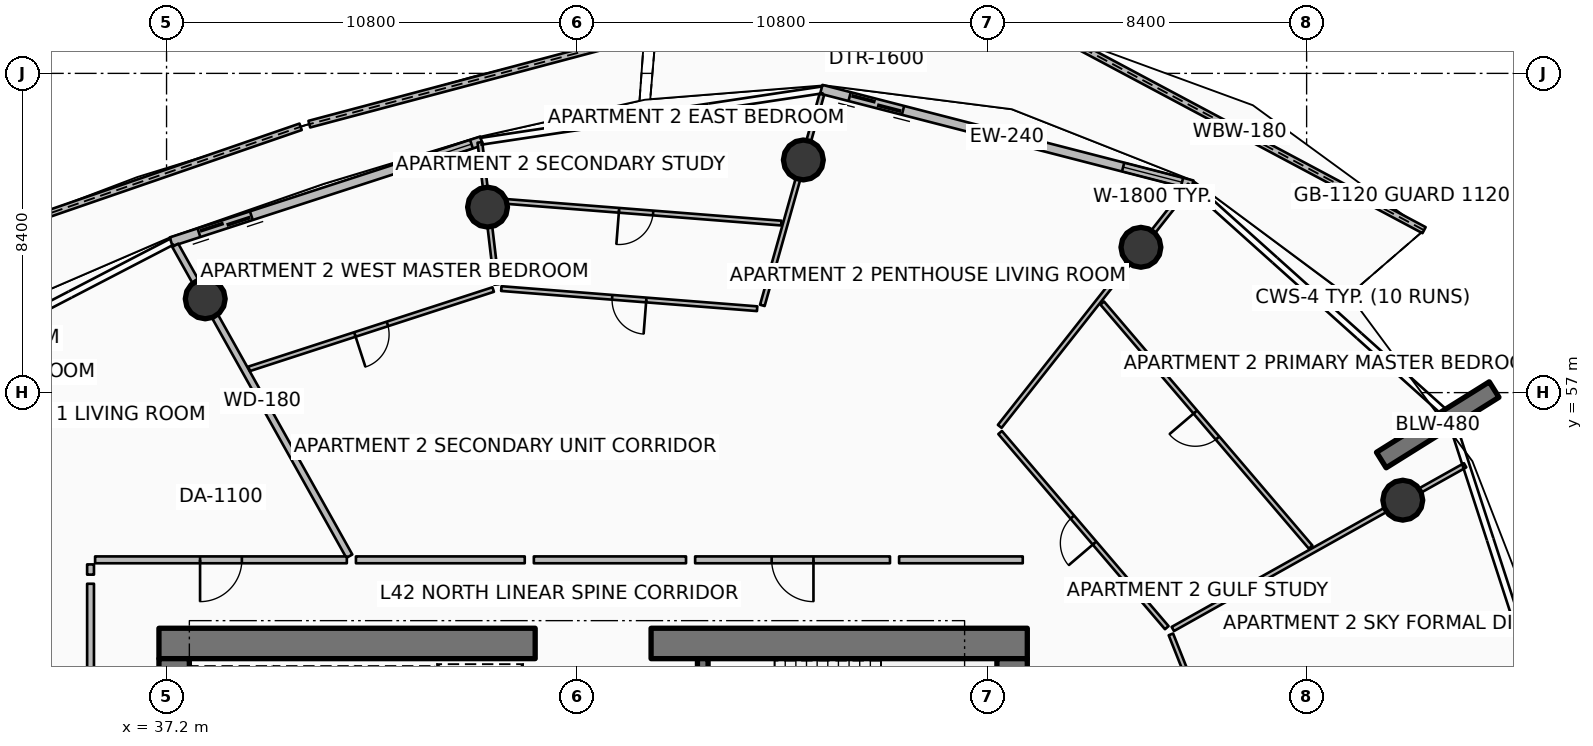
"""IFC4 building model, lengths in metres.
Left out: names, types, materials, properties, quantities, classifications, styles, units other than length and angle.
Written with IfcOpenShell. Run it as: python <this file> out.ifc"""

import sys

from ifc_helpers import new_model, si_unit, direction, frame, frame_2d, origin, origin_2d, place, context, subcontext, project, spatial, polyline, rectangle, circle, outline, extrude, element, fill, save


model = new_model("IFC4")
c1 = context("Model", 3, precision=1e-05, world=origin(), true_north=direction((0.0, 1.0)))
c2 = subcontext(c1, "Body", "Model", "MODEL_VIEW")
j1 = project(units=[si_unit("LENGTHUNIT", "METRE"), si_unit("PLANEANGLEUNIT", "RADIAN")], contexts=[c1])
p1 = place(None, origin())
s1 = spatial("IfcSite", under=j1, at=p1, CompositionType="ELEMENT")
p2 = place(p1, origin())
s2 = spatial("IfcBuilding", under=s1, at=p2, CompositionType="ELEMENT")
p3 = place(p2, frame((0.0, 0.0, 169.05)))
s3 = spatial("IfcBuildingStorey", under=s2, at=p3, CompositionType="ELEMENT", Elevation=169.05)
p4 = place(p3, frame((37.0, 50.4, 0.0), z_axis=(0.0, 0.0, 1.0), x_axis=(1.0, 0.0, 0.0)))
e1 = element("IfcWall", 1, at=p4, inside=s3, PredefinedType="SHEAR", context=c2, shape_type="SweptSolid", body=[
    extrude(rectangle(XDim=9.9, YDim=0.8, at=frame_2d((4.95, 0.0))), origin(), (0.0, 0.0, 1.0), 3.75),
])
p5 = place(p3, frame((49.95, 50.4, 0.0), z_axis=(0.0, 0.0, 1.0), x_axis=(1.0, 0.0, 0.0)))
e2 = element("IfcWall", 2, at=p5, inside=s3, PredefinedType="SHEAR", context=c2, shape_type="SweptSolid", body=[
    extrude(rectangle(XDim=9.9, YDim=0.8, at=frame_2d((4.95, 0.0))), origin(), (0.0, 0.0, 1.0), 3.75),
])
for number, where, z_axis, x_axis in (
    (3, (37.4, 34.0, 0.0), (0.0, 0.0, 1.0), (0.0, 1.0, 0.0)),
    (4, (59.45, 34.0, 0.0), (0.0, 0.0, 1.0), (0.0, 1.0, 0.0)),
):
    element("IfcWall", number, at=place(p3, frame(where, z_axis=z_axis, x_axis=x_axis)), inside=s3, PredefinedType="SHEAR", context=c2, shape_type="SweptSolid", body=[
        extrude(rectangle(XDim=16.0, YDim=0.8, at=frame_2d((8.0, 0.0))), origin(), (0.0, 0.0, 1.0), 3.75),
    ])
p6 = place(p3, frame((51.31, 46.5, 0.0), z_axis=(0.0, 0.0, 1.0), x_axis=(0.0, 1.0, 0.0)))
e5 = element("IfcWall", 5, at=p6, inside=s3, PredefinedType="SHEAR", context=c2, shape_type="SweptSolid", body=[
    extrude(rectangle(XDim=3.5, YDim=0.28, at=frame_2d((1.75, 0.0))), origin(), (0.0, 0.0, 1.0), 3.75),
])
p7 = place(p3, frame((69.165, 55.226, 0.0), z_axis=(0.0, 0.0, 1.0), x_axis=(0.848053161125, 0.529911158502, 0.0)))
e6 = element("IfcWall", 6, at=p7, inside=s3, PredefinedType="SOLIDWALL", context=c2, shape_type="SweptSolid", body=[
    extrude(rectangle(XDim=3.5, YDim=0.48, at=frame_2d((1.75, 0.0))), origin(), (0.0, 0.0, 1.0), 3.75),
])
for number, where, z_axis, x_axis in (
    (7, (69.73, 54.169, 0.0), (0.0, 0.0, 1.0), (1.0, 0.0, 0.0)),
    (8, (62.84, 60.824, 0.0), (0.0, 0.0, 1.0), (1.0, 0.0, 0.0)),
    (9, (53.957, 63.122, 0.0), (0.0, 0.0, 1.0), (1.0, 0.0, 0.0)),
    (10, (45.647, 61.881, 0.0), (0.0, 0.0, 1.0), (1.0, 0.0, 0.0)),
    (11, (38.218, 59.467, 0.0), (0.0, 0.0, 1.0), (1.0, 0.0, 0.0)),
):
    element("IfcColumn", number, at=place(p3, frame(where, z_axis=z_axis, x_axis=x_axis)), inside=s3, PredefinedType="COLUMN", context=c2, shape_type="SweptSolid", body=[
        extrude(circle(Radius=0.525, at=origin_2d()), origin(), (0.0, 0.0, 1.0), 3.5),
    ])
p8 = place(p3, frame((70.29, 61.274, 0.0), z_axis=(0.0, 0.0, 1.0), x_axis=(-0.882327117471, 0.470636651543, 0.0)))
e12 = element("IfcWall", 12, at=p8, inside=s3, PredefinedType="PARAPET", context=c2, shape_type="SweptSolid", body=[
    extrude(outline(polyline([(0.0, 0.0), (10.992, 0.0), (10.992, 1.632), (5.496, 1.798), (0.0, 1.86), (0.0, 0.0)])), frame((0.0, 0.09, 0.0), z_axis=(0.0, -1.0, 0.0), x_axis=(1.0, 0.0, 0.0)), (0.0, 0.0, 1.0), 0.18),
])
p9 = place(p3, frame((49.771, 66.404, 0.0), z_axis=(0.0, 0.0, 1.0), x_axis=(-0.966520511407, -0.256589362658, 0.0)))
e13 = element("IfcWall", 13, at=p9, inside=s3, PredefinedType="PARAPET", context=c2, shape_type="SweptSolid", body=[
    extrude(outline(polyline([(0.0, 0.0), (9.119, 0.0), (9.119, 1.148), (4.56, 1.127), (0.0, 1.224), (0.0, 0.0)])), frame((0.0, 0.09, 0.0), z_axis=(0.0, -1.0, 0.0), x_axis=(1.0, 0.0, 0.0)), (0.0, 0.0, 1.0), 0.18),
])
p10 = place(p3, frame((40.728, 63.994, 0.0), z_axis=(0.0, 0.0, 1.0), x_axis=(-0.945395712623, -0.325924755971, 0.0)))
e14 = element("IfcWall", 14, at=p10, inside=s3, PredefinedType="PARAPET", context=c2, shape_type="SweptSolid", body=[
    extrude(outline(polyline([(0.0, 0.0), (9.244, 0.0), (9.244, 1.483), (4.622, 1.284), (0.0, 1.148), (0.0, 0.0)])), frame((0.0, 0.09, 0.0), z_axis=(0.0, -1.0, 0.0), x_axis=(1.0, 0.0, 0.0)), (0.0, 0.0, 1.0), 0.18),
])
p11 = place(p3, frame((64.192, 62.466, 0.0), z_axis=(0.0, 0.0, 1.0), x_axis=(-0.968379685126, 0.249481032214, 0.0)))
e15 = element("IfcWall", 15, at=p11, inside=s3, PredefinedType="SOLIDWALL", context=c2, shape_type="SweptSolid", body=[
    extrude(rectangle(XDim=10.082, YDim=0.24, at=frame_2d((5.041, 0.0))), origin(), (0.0, 0.0, 1.0), 2.45),
])
p12 = place(p11, frame((7.862, 0.0, 0.0)))
e16 = element("IfcOpeningElement", 16, at=p12, cuts=e15, PredefinedType="OPENING", context=c2, shape_type="SweptSolid", body=[
    extrude(rectangle(XDim=1.45, YDim=2.15, at=frame_2d((0.725, 1.075))), frame((0.0, 0.13, 0.0), z_axis=(0.0, -1.0, 0.0), x_axis=(1.0, 0.0, 0.0)), (0.0, 0.0, 1.0), 0.26),
])
p13 = place(p11, frame((0.28, 0.0, 0.65)))
e17 = element("IfcOpeningElement", 17, at=p13, cuts=e15, PredefinedType="OPENING", context=c2, shape_type="SweptSolid", body=[
    extrude(rectangle(XDim=1.6, YDim=1.5, at=frame_2d((0.8, 0.75))), frame((0.0, 0.13, 0.0), z_axis=(0.0, -1.0, 0.0), x_axis=(1.0, 0.0, 0.0)), (0.0, 0.0, 1.0), 0.26),
])
p14 = place(p3, frame((45.49, 63.624, 0.0), z_axis=(0.0, 0.0, 1.0), x_axis=(-0.951046390632, -0.309048156224, 0.0)))
e18 = element("IfcWall", 18, at=p14, inside=s3, PredefinedType="SOLIDWALL", context=c2, shape_type="SweptSolid", body=[
    extrude(rectangle(XDim=8.59, YDim=0.24, at=frame_2d((4.295, 0.0))), origin(), (0.0, 0.0, 1.0), 2.45),
])
p15 = place(p14, frame((6.37, 0.0, 0.0)))
e19 = element("IfcOpeningElement", 19, at=p15, cuts=e18, PredefinedType="OPENING", context=c2, shape_type="SweptSolid", body=[
    extrude(rectangle(XDim=1.45, YDim=2.15, at=frame_2d((0.725, 1.075))), frame((0.0, 0.13, 0.0), z_axis=(0.0, -1.0, 0.0), x_axis=(1.0, 0.0, 0.0)), (0.0, 0.0, 1.0), 0.26),
])
p16 = place(p14, frame((0.28, 0.0, 0.65)))
e20 = element("IfcOpeningElement", 20, at=p16, cuts=e18, PredefinedType="OPENING", context=c2, shape_type="SweptSolid", body=[
    extrude(rectangle(XDim=1.6, YDim=1.5, at=frame_2d((0.8, 0.75))), frame((0.0, 0.13, 0.0), z_axis=(0.0, -1.0, 0.0), x_axis=(1.0, 0.0, 0.0)), (0.0, 0.0, 1.0), 0.26),
])
p17 = place(p3, frame((42.01, 52.696, 0.0), z_axis=(0.0, 0.0, 1.0), x_axis=(-0.488627157427, 0.872492693967, 0.0)))
e21 = element("IfcWall", 21, at=p17, inside=s3, PredefinedType="PARTITIONING", context=c2, shape_type="SweptSolid", body=[
    extrude(rectangle(XDim=9.375, YDim=0.18, at=frame_2d((4.688, 0.0))), origin(), (0.0, 0.0, 1.0), 2.94),
])
p18 = place(p3, frame((41.944, 52.6, 0.0), z_axis=(0.0, 0.0, 1.0), x_axis=(-1.0, 0.0, 0.0)))
e22 = element("IfcWall", 22, at=p18, inside=s3, PredefinedType="PARTITIONING", context=c2, shape_type="SweptSolid", body=[
    extrude(rectangle(XDim=6.624, YDim=0.18, at=frame_2d((3.312, 0.0))), origin(), (0.0, 0.0, 1.0), 2.94),
])
p19 = place(p18, frame((2.762, 0.0, 0.0)))
e23 = element("IfcOpeningElement", 23, at=p19, cuts=e22, PredefinedType="OPENING", context=c2, shape_type="SweptSolid", body=[
    extrude(rectangle(XDim=1.1, YDim=2.1, at=frame_2d((0.55, 1.05))), frame((0.0, 0.1, 0.0), z_axis=(0.0, -1.0, 0.0), x_axis=(1.0, 0.0, 0.0)), (0.0, 0.0, 1.0), 0.2),
])
p20 = place(p3, frame((35.2, 52.48, 0.0), z_axis=(0.0, 0.0, 1.0), x_axis=(0.0, -1.0, 0.0)))
e24 = element("IfcWall", 24, at=p20, inside=s3, PredefinedType="PARTITIONING", context=c2, shape_type="SweptSolid", body=[
    extrude(rectangle(XDim=0.269, YDim=0.18, at=frame_2d((0.135, 0.0))), origin(), (0.0, 0.0, 1.0), 2.94),
])
p21 = place(p3, frame((35.2, 51.971, 0.0), z_axis=(0.0, 0.0, 1.0), x_axis=(0.0, -1.0, 0.0)))
e25 = element("IfcWall", 25, at=p21, inside=s3, PredefinedType="PARTITIONING", context=c2, shape_type="SweptSolid", body=[
    extrude(rectangle(XDim=6.241, YDim=0.18, at=frame_2d((3.12, 0.0))), origin(), (0.0, 0.0, 1.0), 2.94),
])
p22 = place(p3, frame((56.236, 52.6, 0.0), z_axis=(0.0, 0.0, 1.0), x_axis=(-1.0, 0.0, 0.0)))
e26 = element("IfcWall", 26, at=p22, inside=s3, PredefinedType="PARTITIONING", context=c2, shape_type="SweptSolid", body=[
    extrude(rectangle(XDim=5.127, YDim=0.18, at=frame_2d((2.563, 0.0))), origin(), (0.0, 0.0, 1.0), 2.94),
])
p23 = place(p22, frame((2.013, 0.0, 0.0)))
e27 = element("IfcOpeningElement", 27, at=p23, cuts=e26, PredefinedType="OPENING", context=c2, shape_type="SweptSolid", body=[
    extrude(rectangle(XDim=1.1, YDim=2.1, at=frame_2d((0.55, 1.05))), frame((0.0, 0.1, 0.0), z_axis=(0.0, -1.0, 0.0), x_axis=(1.0, 0.0, 0.0)), (0.0, 0.0, 1.0), 0.2),
])
p24 = place(p3, frame((65.3, 46.437, 0.0), z_axis=(0.0, 0.0, 1.0), x_axis=(-0.369584254435, 0.929197222808, 0.0)))
e28 = element("IfcWall", 28, at=p24, inside=s3, PredefinedType="PARTITIONING", context=c2, shape_type="SweptSolid", body=[
    extrude(rectangle(XDim=4.522, YDim=0.125, at=frame_2d((2.261, 0.0))), origin(), (0.0, 0.0, 1.0), 2.94),
])
p25 = place(p24, frame((1.811, 0.0, 0.0)))
e29 = element("IfcOpeningElement", 29, at=p25, cuts=e28, PredefinedType="OPENING", context=c2, shape_type="SweptSolid", body=[
    extrude(rectangle(XDim=0.9, YDim=2.08, at=frame_2d((0.45, 1.04))), frame((0.0, 0.073, 0.0), z_axis=(0.0, -1.0, 0.0), x_axis=(1.0, 0.0, 0.0)), (0.0, 0.0, 1.0), 0.145),
])
p26 = place(p3, frame((59.73, 52.6, 0.0), z_axis=(0.0, 0.0, 1.0), x_axis=(-1.0, 0.0, 0.0)))
e30 = element("IfcWall", 30, at=p26, inside=s3, PredefinedType="PARTITIONING", context=c2, shape_type="SweptSolid", body=[
    extrude(rectangle(XDim=3.254, YDim=0.18, at=frame_2d((1.627, 0.0))), origin(), (0.0, 0.0, 1.0), 2.94),
])
p27 = place(p3, frame((63.679, 50.781, 0.0), z_axis=(0.0, 0.0, 1.0), x_axis=(0.872493265844, 0.488626136281, 0.0)))
e31 = element("IfcWall", 31, at=p27, inside=s3, PredefinedType="PARTITIONING", context=c2, shape_type="SweptSolid", body=[
    extrude(rectangle(XDim=8.816, YDim=0.125, at=frame_2d((4.408, 0.0))), origin(), (0.0, 0.0, 1.0), 2.94),
])
p28 = place(p3, frame((59.125, 56.112, 0.0), z_axis=(0.0, 0.0, 1.0), x_axis=(0.61910151414, 0.78531096719, 0.0)))
e32 = element("IfcWall", 32, at=p28, inside=s3, PredefinedType="PARTITIONING", context=c2, shape_type="SweptSolid", body=[
    extrude(rectangle(XDim=8.082, YDim=0.125, at=frame_2d((4.041, 0.0))), origin(), (0.0, 0.0, 1.0), 2.94),
])
p29 = place(p3, frame((63.52, 50.815, 0.0), z_axis=(0.0, 0.0, 1.0), x_axis=(-0.649447526186, 0.760406411553, 0.0)))
e33 = element("IfcWall", 33, at=p29, inside=s3, PredefinedType="PARTITIONING", context=c2, shape_type="SweptSolid", body=[
    extrude(rectangle(XDim=6.753, YDim=0.125, at=frame_2d((3.376, 0.0))), origin(), (0.0, 0.0, 1.0), 2.94),
])
p30 = place(p29, frame((2.926, 0.0, 0.0)))
e34 = element("IfcOpeningElement", 34, at=p30, cuts=e33, PredefinedType="OPENING", context=c2, shape_type="SweptSolid", body=[
    extrude(rectangle(XDim=0.9, YDim=2.08, at=frame_2d((0.45, 1.04))), frame((0.0, 0.073, 0.0), z_axis=(0.0, -1.0, 0.0), x_axis=(1.0, 0.0, 0.0)), (0.0, 0.0, 1.0), 0.145),
])
p31 = place(p3, frame((67.306, 52.935, 0.0), z_axis=(0.0, 0.0, 1.0), x_axis=(-0.649454860638, 0.760400147287, 0.0)))
e35 = element("IfcWall", 35, at=p31, inside=s3, PredefinedType="PARTITIONING", context=c2, shape_type="SweptSolid", body=[
    extrude(rectangle(XDim=8.446, YDim=0.125, at=frame_2d((4.223, 0.0))), origin(), (0.0, 0.0, 1.0), 2.94),
])
p32 = place(p31, frame((3.773, 0.0, 0.0)))
e36 = element("IfcOpeningElement", 36, at=p32, cuts=e35, PredefinedType="OPENING", context=c2, shape_type="SweptSolid", body=[
    extrude(rectangle(XDim=0.9, YDim=2.08, at=frame_2d((0.45, 1.04))), frame((0.0, 0.073, 0.0), z_axis=(0.0, -1.0, 0.0), x_axis=(1.0, 0.0, 0.0)), (0.0, 0.0, 1.0), 0.145),
])
p33 = place(p3, frame((50.869, 52.6, 0.0), z_axis=(0.0, 0.0, 1.0), x_axis=(-1.0, 0.0, 0.0)))
e37 = element("IfcWall", 37, at=p33, inside=s3, PredefinedType="PARTITIONING", context=c2, shape_type="SweptSolid", body=[
    extrude(rectangle(XDim=4.004, YDim=0.18, at=frame_2d((2.002, 0.0))), origin(), (0.0, 0.0, 1.0), 2.94),
])
p34 = place(p3, frame((52.878, 59.295, 0.0), z_axis=(0.0, 0.0, 1.0), x_axis=(0.271461170106, 0.962449392501, 0.0)))
e38 = element("IfcWall", 38, at=p34, inside=s3, PredefinedType="PARTITIONING", context=c2, shape_type="SweptSolid", body=[
    extrude(rectangle(XDim=5.769, YDim=0.125, at=frame_2d((2.885, 0.0))), origin(), (0.0, 0.0, 1.0), 2.94),
])
p35 = place(p3, frame((52.741, 59.208, 0.0), z_axis=(0.0, 0.0, 1.0), x_axis=(-0.996917452966, 0.078457580711, 0.0)))
e39 = element("IfcWall", 39, at=p35, inside=s3, PredefinedType="PARTITIONING", context=c2, shape_type="SweptSolid", body=[
    extrude(rectangle(XDim=6.752, YDim=0.125, at=frame_2d((3.376, 0.0))), origin(), (0.0, 0.0, 1.0), 2.94),
])
p36 = place(p35, frame((2.926, 0.0, 0.0)))
e40 = element("IfcOpeningElement", 40, at=p36, cuts=e39, PredefinedType="OPENING", context=c2, shape_type="SweptSolid", body=[
    extrude(rectangle(XDim=0.9, YDim=2.08, at=frame_2d((0.45, 1.04))), frame((0.0, 0.073, 0.0), z_axis=(0.0, -1.0, 0.0), x_axis=(1.0, 0.0, 0.0)), (0.0, 0.0, 1.0), 0.145),
])
p37 = place(p3, frame((53.376, 61.461, 0.0), z_axis=(0.0, 0.0, 1.0), x_axis=(-0.996916336075, 0.078471771143, 0.0)))
e41 = element("IfcWall", 41, at=p37, inside=s3, PredefinedType="PARTITIONING", context=c2, shape_type="SweptSolid", body=[
    extrude(rectangle(XDim=7.666, YDim=0.125, at=frame_2d((3.833, 0.0))), origin(), (0.0, 0.0, 1.0), 2.94),
])
p38 = place(p37, frame((3.383, 0.0, 0.0)))
e42 = element("IfcOpeningElement", 42, at=p38, cuts=e41, PredefinedType="OPENING", context=c2, shape_type="SweptSolid", body=[
    extrude(rectangle(XDim=0.9, YDim=2.08, at=frame_2d((0.45, 1.04))), frame((0.0, 0.073, 0.0), z_axis=(0.0, -1.0, 0.0), x_axis=(1.0, 0.0, 0.0)), (0.0, 0.0, 1.0), 0.145),
])
p39 = place(p3, frame((46.625, 52.6, 0.0), z_axis=(0.0, 0.0, 1.0), x_axis=(-1.0, 0.0, 0.0)))
e43 = element("IfcWall", 43, at=p39, inside=s3, PredefinedType="PARTITIONING", context=c2, shape_type="SweptSolid", body=[
    extrude(rectangle(XDim=4.442, YDim=0.18, at=frame_2d((2.221, 0.0))), origin(), (0.0, 0.0, 1.0), 2.94),
])
p40 = place(p3, frame((45.888, 59.845, 0.0), z_axis=(0.0, 0.0, 1.0), x_axis=(-0.117510984651, 0.99307158276, 0.0)))
e44 = element("IfcWall", 44, at=p40, inside=s3, PredefinedType="PARTITIONING", context=c2, shape_type="SweptSolid", body=[
    extrude(rectangle(XDim=3.765, YDim=0.125, at=frame_2d((1.882, 0.0))), origin(), (0.0, 0.0, 1.0), 2.94),
])
p41 = place(p3, frame((45.795, 59.712, 0.0), z_axis=(0.0, 0.0, 1.0), x_axis=(-0.951056650279, -0.309016582016, 0.0)))
e45 = element("IfcWall", 45, at=p41, inside=s3, PredefinedType="PARTITIONING", context=c2, shape_type="SweptSolid", body=[
    extrude(rectangle(XDim=6.753, YDim=0.125, at=frame_2d((3.376, 0.0))), origin(), (0.0, 0.0, 1.0), 2.94),
])
p42 = place(p41, frame((2.926, 0.0, 0.0)))
e46 = element("IfcOpeningElement", 46, at=p42, cuts=e45, PredefinedType="OPENING", context=c2, shape_type="SweptSolid", body=[
    extrude(rectangle(XDim=0.9, YDim=2.08, at=frame_2d((0.45, 1.04))), frame((0.0, 0.073, 0.0), z_axis=(0.0, -1.0, 0.0), x_axis=(1.0, 0.0, 0.0)), (0.0, 0.0, 1.0), 0.145),
])
p43 = place(p12, origin())
e47 = element("IfcDoor", 47, at=p43, inside=s3, OperationType="DOUBLE_DOOR_SLIDING", PredefinedType="DOOR", context=c2, shape_type="SweptSolid", body=[
    extrude(rectangle(XDim=1.45, YDim=2.15, at=frame_2d((0.725, 1.075))), frame((0.0, 0.025, 0.0), z_axis=(0.0, -1.0, 0.0), x_axis=(1.0, 0.0, 0.0)), (0.0, 0.0, 1.0), 0.05),
])
fill(e16, e47)
p44 = place(p13, origin())
e48 = element("IfcWindow", 48, at=p44, inside=s3, PartitioningType="SINGLE_PANEL", PredefinedType="WINDOW", context=c2, shape_type="SweptSolid", body=[
    extrude(rectangle(XDim=1.6, YDim=1.5, at=frame_2d((0.8, 0.75))), frame((0.0, 0.03, 0.0), z_axis=(0.0, -1.0, 0.0), x_axis=(1.0, 0.0, 0.0)), (0.0, 0.0, 1.0), 0.06),
])
fill(e17, e48)
p45 = place(p15, origin())
e49 = element("IfcDoor", 49, at=p45, inside=s3, OperationType="DOUBLE_DOOR_SLIDING", PredefinedType="DOOR", context=c2, shape_type="SweptSolid", body=[
    extrude(rectangle(XDim=1.45, YDim=2.15, at=frame_2d((0.725, 1.075))), frame((0.0, 0.025, 0.0), z_axis=(0.0, -1.0, 0.0), x_axis=(1.0, 0.0, 0.0)), (0.0, 0.0, 1.0), 0.05),
])
fill(e19, e49)
p46 = place(p16, origin())
e50 = element("IfcWindow", 50, at=p46, inside=s3, PartitioningType="SINGLE_PANEL", PredefinedType="WINDOW", context=c2, shape_type="SweptSolid", body=[
    extrude(rectangle(XDim=1.6, YDim=1.5, at=frame_2d((0.8, 0.75))), frame((0.0, 0.03, 0.0), z_axis=(0.0, -1.0, 0.0), x_axis=(1.0, 0.0, 0.0)), (0.0, 0.0, 1.0), 0.06),
])
fill(e20, e50)
p47 = place(p19, origin())
e51 = element("IfcDoor", 51, at=p47, inside=s3, OperationType="SINGLE_SWING_RIGHT", PredefinedType="DOOR", context=c2, shape_type="SweptSolid", body=[
    extrude(rectangle(XDim=1.1, YDim=2.1, at=frame_2d((0.55, 1.05))), frame((0.0, 0.025, 0.0), z_axis=(0.0, -1.0, 0.0), x_axis=(1.0, 0.0, 0.0)), (0.0, 0.0, 1.0), 0.05),
])
fill(e23, e51)
p48 = place(p23, origin())
e52 = element("IfcDoor", 52, at=p48, inside=s3, OperationType="SINGLE_SWING_LEFT", PredefinedType="DOOR", context=c2, shape_type="SweptSolid", body=[
    extrude(rectangle(XDim=1.1, YDim=2.1, at=frame_2d((0.55, 1.05))), frame((0.0, 0.025, 0.0), z_axis=(0.0, -1.0, 0.0), x_axis=(1.0, 0.0, 0.0)), (0.0, 0.0, 1.0), 0.05),
])
fill(e27, e52)
p49 = place(p30, origin())
e53 = element("IfcDoor", 53, at=p49, inside=s3, OperationType="SINGLE_SWING_LEFT", PredefinedType="DOOR", context=c2, shape_type="SweptSolid", body=[
    extrude(rectangle(XDim=0.9, YDim=2.08, at=frame_2d((0.45, 1.04))), frame((0.0, 0.025, 0.0), z_axis=(0.0, -1.0, 0.0), x_axis=(1.0, 0.0, 0.0)), (0.0, 0.0, 1.0), 0.05),
])
fill(e34, e53)
p50 = place(p32, origin())
e54 = element("IfcDoor", 54, at=p50, inside=s3, OperationType="SINGLE_SWING_RIGHT", PredefinedType="DOOR", context=c2, shape_type="SweptSolid", body=[
    extrude(rectangle(XDim=0.9, YDim=2.08, at=frame_2d((0.45, 1.04))), frame((0.0, 0.025, 0.0), z_axis=(0.0, -1.0, 0.0), x_axis=(1.0, 0.0, 0.0)), (0.0, 0.0, 1.0), 0.05),
])
fill(e36, e54)
p51 = place(p36, origin())
e55 = element("IfcDoor", 55, at=p51, inside=s3, OperationType="SINGLE_SWING_LEFT", PredefinedType="DOOR", context=c2, shape_type="SweptSolid", body=[
    extrude(rectangle(XDim=0.9, YDim=2.08, at=frame_2d((0.45, 1.04))), frame((0.0, 0.025, 0.0), z_axis=(0.0, -1.0, 0.0), x_axis=(1.0, 0.0, 0.0)), (0.0, 0.0, 1.0), 0.05),
])
fill(e40, e55)
p52 = place(p38, origin())
e56 = element("IfcDoor", 56, at=p52, inside=s3, OperationType="SINGLE_SWING_RIGHT", PredefinedType="DOOR", context=c2, shape_type="SweptSolid", body=[
    extrude(rectangle(XDim=0.9, YDim=2.08, at=frame_2d((0.45, 1.04))), frame((0.0, 0.025, 0.0), z_axis=(0.0, -1.0, 0.0), x_axis=(1.0, 0.0, 0.0)), (0.0, 0.0, 1.0), 0.05),
])
fill(e42, e56)
p53 = place(p42, origin())
e57 = element("IfcDoor", 57, at=p53, inside=s3, OperationType="SINGLE_SWING_RIGHT", PredefinedType="DOOR", context=c2, shape_type="SweptSolid", body=[
    extrude(rectangle(XDim=0.9, YDim=2.08, at=frame_2d((0.45, 1.04))), frame((0.0, 0.025, 0.0), z_axis=(0.0, -1.0, 0.0), x_axis=(1.0, 0.0, 0.0)), (0.0, 0.0, 1.0), 0.05),
])
fill(e46, e57)
save(model, sys.argv[1])
